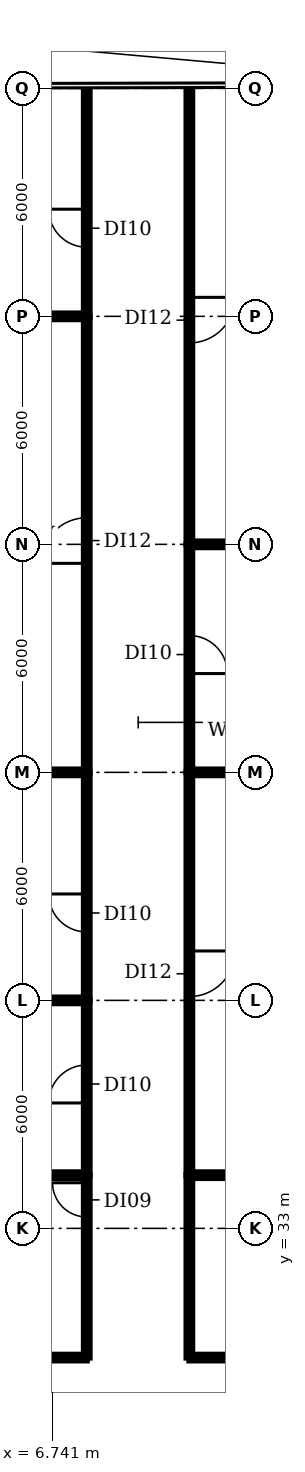
"""IFC4 building model, lengths in metres.
Left out: names, types, materials, properties, quantities, classifications, styles, units other than length and angle.
Written with IfcOpenShell. Run it as: python <this file> out.ifc"""

import sys

from ifc_helpers import new_model, si_unit, direction, frame, frame_2d, origin, place, context, subcontext, project, spatial, rectangle, extrude, element, fill, save


model = new_model("IFC4")
c1 = context("Model", 3, precision=1e-05, world=origin(), true_north=direction((0.0, 1.0)))
c2 = subcontext(c1, "Body", "Model", "MODEL_VIEW")
j1 = project(units=[si_unit("LENGTHUNIT", "METRE"), si_unit("PLANEANGLEUNIT", "RADIAN")], contexts=[c1])
p1 = place(None, origin())
s1 = spatial("IfcSite", under=j1, at=p1, CompositionType="ELEMENT")
p2 = place(p1, origin())
s2 = spatial("IfcBuilding", under=s1, at=p2, CompositionType="ELEMENT")
p3 = place(p2, frame((0.0, 0.0, 37.4)))
s3 = spatial("IfcBuildingStorey", under=s2, at=p3, CompositionType="ELEMENT", Elevation=37.4)
for number, where, z_axis, x_axis in (
    (1, (-1.01, 34.4, 0.0), (0.0, 0.0, 1.0), (1.0, 0.0, 0.0)),
    (2, (-1.01, 39.0, 0.0), (0.0, 0.0, 1.0), (1.0, 0.0, 0.0)),
    (3, (-1.01, 45.0, 0.0), (0.0, 0.0, 1.0), (1.0, 0.0, 0.0)),
    (4, (-1.01, 57.0, 0.0), (0.0, 0.0, 1.0), (1.0, 0.0, 0.0)),
):
    element("IfcWall", number, at=place(p3, frame(where, z_axis=z_axis, x_axis=x_axis)), inside=s3, PredefinedType="PARTITIONING", context=c2, shape_type="SweptSolid", body=[
        extrude(rectangle(XDim=8.66, YDim=0.15, at=frame_2d((4.33, 0.0))), origin(), (0.0, 0.0, 1.0), 2.83),
    ])
p4 = place(p3, frame((2.4, 29.6, 0.0), z_axis=(0.0, 0.0, 1.0), x_axis=(1.0, 0.0, 0.0)))
e5 = element("IfcWall", 5, at=p4, inside=s3, PredefinedType="PARTITIONING", context=c2, shape_type="SweptSolid", body=[
    extrude(rectangle(XDim=5.25, YDim=0.15, at=frame_2d((2.625, 0.0))), origin(), (0.0, 0.0, 1.0), 2.83),
])
p5 = place(p3, frame((7.65, 29.6, 0.0), z_axis=(0.0, 0.0, 1.0), x_axis=(0.0, 1.0, 0.0)))
e6 = element("IfcWall", 6, at=p5, inside=s3, PredefinedType="PARTITIONING", context=c2, shape_type="SweptSolid", body=[
    extrude(rectangle(XDim=4.8, YDim=0.15, at=frame_2d((2.4, 0.0))), origin(), (0.0, 0.0, 1.0), 2.83),
])
p6 = place(p5, frame((3.7, 0.0, 0.0)))
e7 = element("IfcOpeningElement", 7, at=p6, cuts=e6, PredefinedType="OPENING", context=c2, shape_type="SweptSolid", body=[
    extrude(rectangle(XDim=0.9, YDim=2.1, at=frame_2d((0.45, 1.05))), frame((0.0, 0.085, 0.0), z_axis=(0.0, -1.0, 0.0), x_axis=(1.0, 0.0, 0.0)), (0.0, 0.0, 1.0), 0.17),
])
p7 = place(p3, frame((7.65, 34.4, 0.0), z_axis=(0.0, 0.0, 1.0), x_axis=(0.0, 1.0, 0.0)))
e8 = element("IfcWall", 8, at=p7, inside=s3, PredefinedType="PARTITIONING", context=c2, shape_type="SweptSolid", body=[
    extrude(rectangle(XDim=4.6, YDim=0.15, at=frame_2d((2.3, 0.0))), origin(), (0.0, 0.0, 1.0), 2.83),
])
p8 = place(p7, frame((1.9, 0.0, 0.0)))
e9 = element("IfcOpeningElement", 9, at=p8, cuts=e8, PredefinedType="OPENING", context=c2, shape_type="SweptSolid", body=[
    extrude(rectangle(XDim=1.0, YDim=2.1, at=frame_2d((0.5, 1.05))), frame((0.0, 0.085, 0.0), z_axis=(0.0, -1.0, 0.0), x_axis=(1.0, 0.0, 0.0)), (0.0, 0.0, 1.0), 0.17),
])
p9 = place(p3, frame((7.65, 39.0, 0.0), z_axis=(0.0, 0.0, 1.0), x_axis=(0.0, 1.0, 0.0)))
e10 = element("IfcWall", 10, at=p9, inside=s3, PredefinedType="PARTITIONING", context=c2, shape_type="SweptSolid", body=[
    extrude(rectangle(XDim=6.0, YDim=0.15, at=frame_2d((3.0, 0.0))), origin(), (0.0, 0.0, 1.0), 2.83),
])
p10 = place(p9, frame((1.8, 0.0, 0.0)))
e11 = element("IfcOpeningElement", 11, at=p10, cuts=e10, PredefinedType="OPENING", context=c2, shape_type="SweptSolid", body=[
    extrude(rectangle(XDim=1.0, YDim=2.1, at=frame_2d((0.5, 1.05))), frame((0.0, 0.085, 0.0), z_axis=(0.0, -1.0, 0.0), x_axis=(1.0, 0.0, 0.0)), (0.0, 0.0, 1.0), 0.17),
])
p11 = place(p3, frame((7.65, 45.0, 0.0), z_axis=(0.0, 0.0, 1.0), x_axis=(0.0, 1.0, 0.0)))
e12 = element("IfcWall", 12, at=p11, inside=s3, PredefinedType="PARTITIONING", context=c2, shape_type="SweptSolid", body=[
    extrude(rectangle(XDim=12.0, YDim=0.15, at=frame_2d((6.0, 0.0))), origin(), (0.0, 0.0, 1.0), 2.83),
])
p12 = place(p11, frame((5.5, 0.0, 0.0)))
e13 = element("IfcOpeningElement", 13, at=p12, cuts=e12, PredefinedType="OPENING", context=c2, shape_type="SweptSolid", body=[
    extrude(rectangle(XDim=1.2, YDim=2.1, at=frame_2d((0.6, 1.05))), frame((0.0, 0.085, 0.0), z_axis=(0.0, -1.0, 0.0), x_axis=(1.0, 0.0, 0.0)), (0.0, 0.0, 1.0), 0.17),
])
p13 = place(p3, frame((7.65, 57.0, 0.0), z_axis=(0.0, 0.0, 1.0), x_axis=(0.0, 1.0, 0.0)))
e14 = element("IfcWall", 14, at=p13, inside=s3, PredefinedType="PARTITIONING", context=c2, shape_type="SweptSolid", body=[
    extrude(rectangle(XDim=6.02, YDim=0.15, at=frame_2d((3.01, 0.0))), origin(), (0.0, 0.0, 1.0), 2.83),
])
p14 = place(p13, frame((1.82, 0.0, 0.0)))
e15 = element("IfcOpeningElement", 15, at=p14, cuts=e14, PredefinedType="OPENING", context=c2, shape_type="SweptSolid", body=[
    extrude(rectangle(XDim=1.0, YDim=2.1, at=frame_2d((0.5, 1.05))), frame((0.0, 0.085, 0.0), z_axis=(0.0, -1.0, 0.0), x_axis=(1.0, 0.0, 0.0)), (0.0, 0.0, 1.0), 0.17),
])
p15 = place(p3, frame((10.35, 29.6, 0.0), z_axis=(0.0, 0.0, 1.0), x_axis=(0.0, 1.0, 0.0)))
e16 = element("IfcWall", 16, at=p15, inside=s3, PredefinedType="PARTITIONING", context=c2, shape_type="SweptSolid", body=[
    extrude(rectangle(XDim=4.8, YDim=0.15, at=frame_2d((2.4, 0.0))), origin(), (0.0, 0.0, 1.0), 2.83),
])
p16 = place(p3, frame((10.35, 29.6, 0.0), z_axis=(0.0, 0.0, 1.0), x_axis=(1.0, 0.0, 0.0)))
e17 = element("IfcWall", 17, at=p16, inside=s3, PredefinedType="PARTITIONING", context=c2, shape_type="SweptSolid", body=[
    extrude(rectangle(XDim=4.05, YDim=0.15, at=frame_2d((2.025, 0.0))), origin(), (0.0, 0.0, 1.0), 2.83),
])
p17 = place(p3, frame((10.35, 34.4, 0.0), z_axis=(0.0, 0.0, 1.0), x_axis=(1.0, 0.0, 0.0)))
e18 = element("IfcWall", 18, at=p17, inside=s3, PredefinedType="PARTITIONING", context=c2, shape_type="SweptSolid", body=[
    extrude(rectangle(XDim=15.27, YDim=0.15, at=frame_2d((7.635, 0.0))), origin(), (0.0, 0.0, 1.0), 2.83),
])
p18 = place(p3, frame((10.35, 45.0, 0.0), z_axis=(0.0, 0.0, 1.0), x_axis=(0.0, -1.0, 0.0)))
e19 = element("IfcWall", 19, at=p18, inside=s3, PredefinedType="PARTITIONING", context=c2, shape_type="SweptSolid", body=[
    extrude(rectangle(XDim=10.6, YDim=0.15, at=frame_2d((5.3, 0.0))), origin(), (0.0, 0.0, 1.0), 2.83),
])
p19 = place(p18, frame((4.7, 0.0, 0.0)))
e20 = element("IfcOpeningElement", 20, at=p19, cuts=e19, PredefinedType="OPENING", context=c2, shape_type="SweptSolid", body=[
    extrude(rectangle(XDim=1.2, YDim=2.1, at=frame_2d((0.6, 1.05))), frame((0.0, 0.085, 0.0), z_axis=(0.0, -1.0, 0.0), x_axis=(1.0, 0.0, 0.0)), (0.0, 0.0, 1.0), 0.17),
])
p20 = place(p3, frame((10.35, 45.0, 0.0), z_axis=(0.0, 0.0, 1.0), x_axis=(1.0, 0.0, 0.0)))
e21 = element("IfcWall", 21, at=p20, inside=s3, PredefinedType="PARTITIONING", context=c2, shape_type="SweptSolid", body=[
    extrude(rectangle(XDim=15.92, YDim=0.15, at=frame_2d((7.96, 0.0))), origin(), (0.0, 0.0, 1.0), 2.83),
])
p21 = place(p3, frame((10.35, 51.0, 0.0), z_axis=(0.0, 0.0, 1.0), x_axis=(0.0, -1.0, 0.0)))
e22 = element("IfcWall", 22, at=p21, inside=s3, PredefinedType="PARTITIONING", context=c2, shape_type="SweptSolid", body=[
    extrude(rectangle(XDim=6.0, YDim=0.15, at=frame_2d((3.0, 0.0))), origin(), (0.0, 0.0, 1.0), 2.83),
])
p22 = place(p21, frame((2.4, 0.0, 0.0)))
e23 = element("IfcOpeningElement", 23, at=p22, cuts=e22, PredefinedType="OPENING", context=c2, shape_type="SweptSolid", body=[
    extrude(rectangle(XDim=1.0, YDim=2.1, at=frame_2d((0.5, 1.05))), frame((0.0, 0.085, 0.0), z_axis=(0.0, -1.0, 0.0), x_axis=(1.0, 0.0, 0.0)), (0.0, 0.0, 1.0), 0.17),
])
p23 = place(p3, frame((10.35, 51.0, 0.0), z_axis=(0.0, 0.0, 1.0), x_axis=(1.0, 0.0, 0.0)))
e24 = element("IfcWall", 24, at=p23, inside=s3, PredefinedType="PARTITIONING", context=c2, shape_type="SweptSolid", body=[
    extrude(rectangle(XDim=16.269, YDim=0.15, at=frame_2d((8.134, 0.0))), origin(), (0.0, 0.0, 1.0), 2.83),
])
p24 = place(p3, frame((10.35, 63.015, 0.0), z_axis=(0.0, 0.0, 1.0), x_axis=(0.0, -1.0, 0.0)))
e25 = element("IfcWall", 25, at=p24, inside=s3, PredefinedType="PARTITIONING", context=c2, shape_type="SweptSolid", body=[
    extrude(rectangle(XDim=12.015, YDim=0.15, at=frame_2d((6.007, 0.0))), origin(), (0.0, 0.0, 1.0), 2.83),
])
p25 = place(p24, frame((5.515, 0.0, 0.0)))
e26 = element("IfcOpeningElement", 26, at=p25, cuts=e25, PredefinedType="OPENING", context=c2, shape_type="SweptSolid", body=[
    extrude(rectangle(XDim=1.2, YDim=2.1, at=frame_2d((0.6, 1.05))), frame((0.0, 0.085, 0.0), z_axis=(0.0, -1.0, 0.0), x_axis=(1.0, 0.0, 0.0)), (0.0, 0.0, 1.0), 0.17),
])
p26 = place(p6, origin())
e27 = element("IfcDoor", 27, at=p26, inside=s3, OperationType="SINGLE_SWING_RIGHT", PredefinedType="DOOR", context=c2, shape_type="SweptSolid", body=[
    extrude(rectangle(XDim=0.9, YDim=2.1, at=frame_2d((0.45, 1.05))), frame((0.0, 0.025, 0.0), z_axis=(0.0, -1.0, 0.0), x_axis=(1.0, 0.0, 0.0)), (0.0, 0.0, 1.0), 0.05),
])
fill(e7, e27)
p27 = place(p8, origin())
e28 = element("IfcDoor", 28, at=p27, inside=s3, OperationType="SINGLE_SWING_LEFT", PredefinedType="DOOR", context=c2, shape_type="SweptSolid", body=[
    extrude(rectangle(XDim=1.0, YDim=2.1, at=frame_2d((0.5, 1.05))), frame((0.0, 0.025, 0.0), z_axis=(0.0, -1.0, 0.0), x_axis=(1.0, 0.0, 0.0)), (0.0, 0.0, 1.0), 0.05),
])
fill(e9, e28)
p28 = place(p10, origin())
e29 = element("IfcDoor", 29, at=p28, inside=s3, OperationType="SINGLE_SWING_RIGHT", PredefinedType="DOOR", context=c2, shape_type="SweptSolid", body=[
    extrude(rectangle(XDim=1.0, YDim=2.1, at=frame_2d((0.5, 1.05))), frame((0.0, 0.025, 0.0), z_axis=(0.0, -1.0, 0.0), x_axis=(1.0, 0.0, 0.0)), (0.0, 0.0, 1.0), 0.05),
])
fill(e11, e29)
p29 = place(p12, origin())
e30 = element("IfcDoor", 30, at=p29, inside=s3, OperationType="SINGLE_SWING_LEFT", PredefinedType="DOOR", context=c2, shape_type="SweptSolid", body=[
    extrude(rectangle(XDim=1.2, YDim=2.1, at=frame_2d((0.6, 1.05))), frame((0.0, 0.025, 0.0), z_axis=(0.0, -1.0, 0.0), x_axis=(1.0, 0.0, 0.0)), (0.0, 0.0, 1.0), 0.05),
])
fill(e13, e30)
p30 = place(p14, origin())
e31 = element("IfcDoor", 31, at=p30, inside=s3, OperationType="SINGLE_SWING_RIGHT", PredefinedType="DOOR", context=c2, shape_type="SweptSolid", body=[
    extrude(rectangle(XDim=1.0, YDim=2.1, at=frame_2d((0.5, 1.05))), frame((0.0, 0.025, 0.0), z_axis=(0.0, -1.0, 0.0), x_axis=(1.0, 0.0, 0.0)), (0.0, 0.0, 1.0), 0.05),
])
fill(e15, e31)
p31 = place(p19, origin())
e32 = element("IfcDoor", 32, at=p31, inside=s3, OperationType="SINGLE_SWING_LEFT", PredefinedType="DOOR", context=c2, shape_type="SweptSolid", body=[
    extrude(rectangle(XDim=1.2, YDim=2.1, at=frame_2d((0.6, 1.05))), frame((0.0, 0.025, 0.0), z_axis=(0.0, -1.0, 0.0), x_axis=(1.0, 0.0, 0.0)), (0.0, 0.0, 1.0), 0.05),
])
fill(e20, e32)
p32 = place(p22, origin())
e33 = element("IfcDoor", 33, at=p32, inside=s3, OperationType="SINGLE_SWING_RIGHT", PredefinedType="DOOR", context=c2, shape_type="SweptSolid", body=[
    extrude(rectangle(XDim=1.0, YDim=2.1, at=frame_2d((0.5, 1.05))), frame((0.0, 0.025, 0.0), z_axis=(0.0, -1.0, 0.0), x_axis=(1.0, 0.0, 0.0)), (0.0, 0.0, 1.0), 0.05),
])
fill(e23, e33)
p33 = place(p25, origin())
e34 = element("IfcDoor", 34, at=p33, inside=s3, OperationType="SINGLE_SWING_LEFT", PredefinedType="DOOR", context=c2, shape_type="SweptSolid", body=[
    extrude(rectangle(XDim=1.2, YDim=2.1, at=frame_2d((0.6, 1.05))), frame((0.0, 0.025, 0.0), z_axis=(0.0, -1.0, 0.0), x_axis=(1.0, 0.0, 0.0)), (0.0, 0.0, 1.0), 0.05),
])
fill(e26, e34)
save(model, sys.argv[1])
